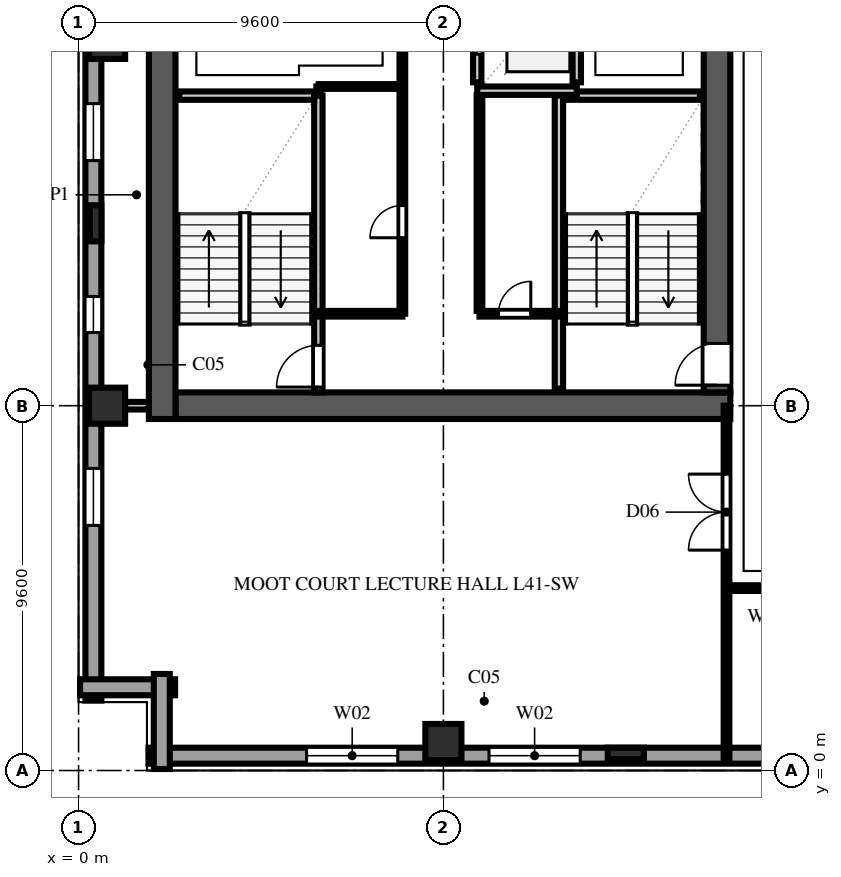
"""IFC4 building model, lengths in metres.
Left out: names, types, materials, properties, quantities, classifications, styles, units other than length and angle.
Written with IfcOpenShell. Run it as: python <this file> out.ifc"""

import sys

from ifc_helpers import new_model, si_unit, direction, frame, frame_2d, origin, origin_2d, place, context, subcontext, project, spatial, rectangle, extrude, element, fill, save


model = new_model("IFC4")
c1 = context("Model", 3, precision=1e-05, world=origin(), true_north=direction((0.0, 1.0)))
c2 = subcontext(c1, "Body", "Model", "MODEL_VIEW")
j1 = project(units=[si_unit("LENGTHUNIT", "METRE"), si_unit("PLANEANGLEUNIT", "RADIAN")], contexts=[c1])
p1 = place(None, origin())
s1 = spatial("IfcSite", under=j1, at=p1, CompositionType="ELEMENT")
p2 = place(p1, origin())
s2 = spatial("IfcBuilding", under=s1, at=p2, CompositionType="ELEMENT")
p3 = place(p2, frame((0.0, 0.0, 163.6)))
s3 = spatial("IfcBuildingStorey", under=s2, at=p3, CompositionType="ELEMENT", Elevation=163.6)
p4 = place(p3, frame((2.55, 9.6, 0.0), z_axis=(0.0, 0.0, 1.0), x_axis=(1.0, 0.0, 0.0)))
e1 = element("IfcWall", 1, at=p4, inside=s3, PredefinedType="SHEAR", context=c2, shape_type="SweptSolid", body=[
    extrude(rectangle(XDim=14.6, YDim=0.7, at=frame_2d((7.3, 0.0))), origin(), (0.0, 0.0, 1.0), 3.54),
])
p5 = place(p3, frame((2.2, 9.25, 0.0), z_axis=(0.0, 0.0, 1.0), x_axis=(0.0, 1.0, 0.0)))
e2 = element("IfcWall", 2, at=p5, inside=s3, PredefinedType="SHEAR", context=c2, shape_type="SweptSolid", body=[
    extrude(rectangle(XDim=39.1, YDim=0.7, at=frame_2d((19.55, 0.0))), origin(), (0.0, 0.0, 1.0), 3.54),
])
p6 = place(p3, frame((16.8, 9.95, 0.0), z_axis=(0.0, 0.0, 1.0), x_axis=(0.0, 1.0, 0.0)))
e3 = element("IfcWall", 3, at=p6, inside=s3, PredefinedType="SHEAR", context=c2, shape_type="SweptSolid", body=[
    extrude(rectangle(XDim=12.45, YDim=0.7, at=frame_2d((6.225, 0.0))), origin(), (0.0, 0.0, 1.0), 3.54),
])
p7 = place(p6, frame((0.19, 0.0, 0.0)))
e4 = element("IfcOpeningElement", 4, at=p7, cuts=e3, PredefinedType="OPENING", context=c2, shape_type="SweptSolid", body=[
    extrude(rectangle(XDim=1.1, YDim=2.2, at=frame_2d((0.55, 1.1))), frame((0.0, 0.362, 0.0), z_axis=(0.0, -1.0, 0.0), x_axis=(1.0, 0.0, 0.0)), (0.0, 0.0, 1.0), 0.724),
])
for number, where, z_axis, x_axis in (
    (5, (0.75, 9.6, 0.0), (0.0, 0.0, 1.0), (1.0, 0.0, 0.0)),
    (6, (0.75, 19.2, 0.0), (0.0, 0.0, 1.0), (1.0, 0.0, 0.0)),
    (7, (9.6, 0.75, 0.0), (0.0, 0.0, 1.0), (1.0, 0.0, 0.0)),
):
    element("IfcColumn", number, at=place(p3, frame(where, z_axis=z_axis, x_axis=x_axis)), inside=s3, PredefinedType="COLUMN", context=c2, shape_type="SweptSolid", body=[
        extrude(rectangle(XDim=0.95, YDim=0.95, at=origin_2d()), origin(), (0.0, 0.0, 1.0), 3.8),
    ])
for number, where, z_axis, x_axis in (
    (8, (0.45, 14.4, 0.0), (0.0, 0.0, 1.0), (0.0, 1.0, 0.0)),
    (9, (14.4, 0.45, 0.0), (0.0, 0.0, 1.0), (1.0, 0.0, 0.0)),
):
    element("IfcColumn", number, at=place(p3, frame(where, z_axis=z_axis, x_axis=x_axis)), inside=s3, PredefinedType="PILASTER", context=c2, shape_type="SweptSolid", body=[
        extrude(rectangle(XDim=0.95, YDim=0.3, at=origin_2d()), origin(), (0.0, 0.0, 1.0), 3.8),
    ])
p8 = place(p3, frame((1.84, 0.39, 0.0), z_axis=(0.0, 0.0, 1.0), x_axis=(1.0, 0.0, 0.0)))
e10 = element("IfcWall", 10, at=p8, inside=s3, PredefinedType="SOLIDWALL", context=c2, shape_type="SweptSolid", body=[
    extrude(rectangle(XDim=53.92, YDim=0.42, at=frame_2d((26.96, 0.0))), origin(), (0.0, 0.0, 1.0), 3.54),
])
p9 = place(p8, frame((4.16, 0.0, 0.85)))
e11 = element("IfcOpeningElement", 11, at=p9, cuts=e10, PredefinedType="OPENING", context=c2, shape_type="SweptSolid", body=[
    extrude(rectangle(XDim=2.4, YDim=1.85, at=frame_2d((1.2, 0.925))), frame((0.0, 0.222, 0.0), z_axis=(0.0, -1.0, 0.0), x_axis=(1.0, 0.0, 0.0)), (0.0, 0.0, 1.0), 0.444),
])
p10 = place(p8, frame((8.96, 0.0, 0.85)))
e12 = element("IfcOpeningElement", 12, at=p10, cuts=e10, PredefinedType="OPENING", context=c2, shape_type="SweptSolid", body=[
    extrude(rectangle(XDim=2.4, YDim=1.85, at=frame_2d((1.2, 0.925))), frame((0.0, 0.222, 0.0), z_axis=(0.0, -1.0, 0.0), x_axis=(1.0, 0.0, 0.0)), (0.0, 0.0, 1.0), 0.444),
])
p11 = place(p8, frame((18.56, 0.0, 0.85)))
e13 = element("IfcOpeningElement", 13, at=p11, cuts=e10, PredefinedType="OPENING", context=c2, shape_type="SweptSolid", body=[
    extrude(rectangle(XDim=2.4, YDim=1.85, at=frame_2d((1.2, 0.925))), frame((0.0, 0.222, 0.0), z_axis=(0.0, -1.0, 0.0), x_axis=(1.0, 0.0, 0.0)), (0.0, 0.0, 1.0), 0.444),
])
p12 = place(p8, frame((28.16, 0.0, 0.85)))
e14 = element("IfcOpeningElement", 14, at=p12, cuts=e10, PredefinedType="OPENING", context=c2, shape_type="SweptSolid", body=[
    extrude(rectangle(XDim=2.4, YDim=1.85, at=frame_2d((1.2, 0.925))), frame((0.0, 0.222, 0.0), z_axis=(0.0, -1.0, 0.0), x_axis=(1.0, 0.0, 0.0)), (0.0, 0.0, 1.0), 0.444),
])
p13 = place(p3, frame((0.39, 65.36, 0.0), z_axis=(0.0, 0.0, 1.0), x_axis=(0.0, -1.0, 0.0)))
e15 = element("IfcWall", 15, at=p13, inside=s3, PredefinedType="SOLIDWALL", context=c2, shape_type="SweptSolid", body=[
    extrude(rectangle(XDim=63.52, YDim=0.42, at=frame_2d((31.76, 0.0))), origin(), (0.0, 0.0, 1.0), 3.54),
])
p14 = place(p13, frame((4.885, 0.0, 0.9)))
e16 = element("IfcOpeningElement", 16, at=p14, cuts=e15, PredefinedType="OPENING", context=c2, shape_type="SweptSolid", body=[
    extrude(rectangle(XDim=0.95, YDim=1.85, at=frame_2d((0.475, 0.925))), frame((0.0, 0.222, 0.0), z_axis=(0.0, -1.0, 0.0), x_axis=(1.0, 0.0, 0.0)), (0.0, 0.0, 1.0), 0.444),
])
p15 = place(p13, frame((9.41, 0.0, 0.9)))
e17 = element("IfcOpeningElement", 17, at=p15, cuts=e15, PredefinedType="OPENING", context=c2, shape_type="SweptSolid", body=[
    extrude(rectangle(XDim=1.5, YDim=1.85, at=frame_2d((0.75, 0.925))), frame((0.0, 0.222, 0.0), z_axis=(0.0, -1.0, 0.0), x_axis=(1.0, 0.0, 0.0)), (0.0, 0.0, 1.0), 0.444),
])
p16 = place(p13, frame((14.485, 0.0, 0.9)))
e18 = element("IfcOpeningElement", 18, at=p16, cuts=e15, PredefinedType="OPENING", context=c2, shape_type="SweptSolid", body=[
    extrude(rectangle(XDim=0.95, YDim=1.85, at=frame_2d((0.475, 0.925))), frame((0.0, 0.222, 0.0), z_axis=(0.0, -1.0, 0.0), x_axis=(1.0, 0.0, 0.0)), (0.0, 0.0, 1.0), 0.444),
])
p17 = place(p13, frame((19.01, 0.0, 0.9)))
e19 = element("IfcOpeningElement", 19, at=p17, cuts=e15, PredefinedType="OPENING", context=c2, shape_type="SweptSolid", body=[
    extrude(rectangle(XDim=1.5, YDim=1.85, at=frame_2d((0.75, 0.925))), frame((0.0, 0.222, 0.0), z_axis=(0.0, -1.0, 0.0), x_axis=(1.0, 0.0, 0.0)), (0.0, 0.0, 1.0), 0.444),
])
p18 = place(p13, frame((24.085, 0.0, 0.9)))
e20 = element("IfcOpeningElement", 20, at=p18, cuts=e15, PredefinedType="OPENING", context=c2, shape_type="SweptSolid", body=[
    extrude(rectangle(XDim=0.95, YDim=1.85, at=frame_2d((0.475, 0.925))), frame((0.0, 0.222, 0.0), z_axis=(0.0, -1.0, 0.0), x_axis=(1.0, 0.0, 0.0)), (0.0, 0.0, 1.0), 0.444),
])
p19 = place(p13, frame((28.61, 0.0, 0.9)))
e21 = element("IfcOpeningElement", 21, at=p19, cuts=e15, PredefinedType="OPENING", context=c2, shape_type="SweptSolid", body=[
    extrude(rectangle(XDim=1.5, YDim=1.85, at=frame_2d((0.75, 0.925))), frame((0.0, 0.222, 0.0), z_axis=(0.0, -1.0, 0.0), x_axis=(1.0, 0.0, 0.0)), (0.0, 0.0, 1.0), 0.444),
])
p20 = place(p13, frame((33.685, 0.0, 0.9)))
e22 = element("IfcOpeningElement", 22, at=p20, cuts=e15, PredefinedType="OPENING", context=c2, shape_type="SweptSolid", body=[
    extrude(rectangle(XDim=0.95, YDim=1.85, at=frame_2d((0.475, 0.925))), frame((0.0, 0.222, 0.0), z_axis=(0.0, -1.0, 0.0), x_axis=(1.0, 0.0, 0.0)), (0.0, 0.0, 1.0), 0.444),
])
p21 = place(p13, frame((38.21, 0.0, 0.9)))
e23 = element("IfcOpeningElement", 23, at=p21, cuts=e15, PredefinedType="OPENING", context=c2, shape_type="SweptSolid", body=[
    extrude(rectangle(XDim=1.5, YDim=1.85, at=frame_2d((0.75, 0.925))), frame((0.0, 0.222, 0.0), z_axis=(0.0, -1.0, 0.0), x_axis=(1.0, 0.0, 0.0)), (0.0, 0.0, 1.0), 0.444),
])
p22 = place(p13, frame((43.285, 0.0, 0.9)))
e24 = element("IfcOpeningElement", 24, at=p22, cuts=e15, PredefinedType="OPENING", context=c2, shape_type="SweptSolid", body=[
    extrude(rectangle(XDim=0.95, YDim=1.85, at=frame_2d((0.475, 0.925))), frame((0.0, 0.222, 0.0), z_axis=(0.0, -1.0, 0.0), x_axis=(1.0, 0.0, 0.0)), (0.0, 0.0, 1.0), 0.444),
])
p23 = place(p13, frame((47.81, 0.0, 0.9)))
e25 = element("IfcOpeningElement", 25, at=p23, cuts=e15, PredefinedType="OPENING", context=c2, shape_type="SweptSolid", body=[
    extrude(rectangle(XDim=1.5, YDim=1.85, at=frame_2d((0.75, 0.925))), frame((0.0, 0.222, 0.0), z_axis=(0.0, -1.0, 0.0), x_axis=(1.0, 0.0, 0.0)), (0.0, 0.0, 1.0), 0.444),
])
p24 = place(p13, frame((52.885, 0.0, 0.9)))
e26 = element("IfcOpeningElement", 26, at=p24, cuts=e15, PredefinedType="OPENING", context=c2, shape_type="SweptSolid", body=[
    extrude(rectangle(XDim=0.95, YDim=1.85, at=frame_2d((0.475, 0.925))), frame((0.0, 0.222, 0.0), z_axis=(0.0, -1.0, 0.0), x_axis=(1.0, 0.0, 0.0)), (0.0, 0.0, 1.0), 0.444),
])
p25 = place(p13, frame((57.41, 0.0, 0.9)))
e27 = element("IfcOpeningElement", 27, at=p25, cuts=e15, PredefinedType="OPENING", context=c2, shape_type="SweptSolid", body=[
    extrude(rectangle(XDim=1.5, YDim=1.85, at=frame_2d((0.75, 0.925))), frame((0.0, 0.222, 0.0), z_axis=(0.0, -1.0, 0.0), x_axis=(1.0, 0.0, 0.0)), (0.0, 0.0, 1.0), 0.444),
])
for number, where, z_axis, x_axis in (
    (28, (0.04, 2.19, 0.0), (0.0, 0.0, 1.0), (1.0, 0.0, 0.0)),
    (29, (2.19, 2.54, 0.0), (0.0, 0.0, 1.0), (0.0, -1.0, 0.0)),
):
    element("IfcWall", number, at=place(p3, frame(where, z_axis=z_axis, x_axis=x_axis)), inside=s3, PredefinedType="SOLIDWALL", context=c2, shape_type="SweptSolid", body=[
        extrude(rectangle(XDim=2.5, YDim=0.42, at=frame_2d((1.25, 0.0))), origin(), (0.0, 0.0, 1.0), 3.54),
    ])
p26 = place(p3, frame((6.31, 9.95, 0.0), z_axis=(0.0, 0.0, 1.0), x_axis=(0.0, 1.0, 0.0)))
e30 = element("IfcWall", 30, at=p26, inside=s3, PredefinedType="SOLIDWALL", context=c2, shape_type="SweptSolid", body=[
    extrude(rectangle(XDim=7.81, YDim=0.22, at=frame_2d((3.905, 0.0))), origin(), (0.0, 0.0, 1.0), 3.54),
])
p27 = place(p26, frame((0.14, 0.0, 0.0)))
e31 = element("IfcOpeningElement", 31, at=p27, cuts=e30, PredefinedType="OPENING", context=c2, shape_type="SweptSolid", body=[
    extrude(rectangle(XDim=1.1, YDim=2.2, at=frame_2d((0.55, 1.1))), frame((0.0, 0.122, 0.0), z_axis=(0.0, -1.0, 0.0), x_axis=(1.0, 0.0, 0.0)), (0.0, 0.0, 1.0), 0.244),
])
p28 = place(p3, frame((2.65, 17.76, 0.0), z_axis=(0.0, 0.0, 1.0), x_axis=(1.0, 0.0, 0.0)))
e32 = element("IfcWall", 32, at=p28, inside=s3, PredefinedType="SOLIDWALL", context=c2, shape_type="SweptSolid", body=[
    extrude(rectangle(XDim=3.55, YDim=0.22, at=frame_2d((1.775, 0.0))), origin(), (0.0, 0.0, 1.0), 3.54),
])
p29 = place(p3, frame((12.64, 10.05, 0.0), z_axis=(0.0, 0.0, 1.0), x_axis=(0.0, 1.0, 0.0)))
e33 = element("IfcWall", 33, at=p29, inside=s3, PredefinedType="SOLIDWALL", context=c2, shape_type="SweptSolid", body=[
    extrude(rectangle(XDim=7.71, YDim=0.22, at=frame_2d((3.855, 0.0))), origin(), (0.0, 0.0, 1.0), 3.54),
])
p30 = place(p3, frame((12.75, 17.76, 0.0), z_axis=(0.0, 0.0, 1.0), x_axis=(1.0, 0.0, 0.0)))
e34 = element("IfcWall", 34, at=p30, inside=s3, PredefinedType="SOLIDWALL", context=c2, shape_type="SweptSolid", body=[
    extrude(rectangle(XDim=3.6, YDim=0.22, at=frame_2d((1.8, 0.0))), origin(), (0.0, 0.0, 1.0), 3.54),
])
p31 = place(p3, frame((10.49, 18.11, 0.0), z_axis=(0.0, 0.0, 1.0), x_axis=(0.0, 1.0, 0.0)))
e35 = element("IfcWall", 35, at=p31, inside=s3, PredefinedType="SOLIDWALL", context=c2, shape_type="SweptSolid", body=[
    extrude(rectangle(XDim=2.58, YDim=0.22, at=frame_2d((1.29, 0.0))), origin(), (0.0, 0.0, 1.0), 3.54),
])
p32 = place(p31, frame((0.74, 0.0, 0.0)))
e36 = element("IfcOpeningElement", 36, at=p32, cuts=e35, PredefinedType="OPENING", context=c2, shape_type="SweptSolid", body=[
    extrude(rectangle(XDim=1.1, YDim=2.2, at=frame_2d((0.55, 1.1))), frame((0.0, 0.122, 0.0), z_axis=(0.0, -1.0, 0.0), x_axis=(1.0, 0.0, 0.0)), (0.0, 0.0, 1.0), 0.244),
])
p33 = place(p3, frame((13.11, 18.11, 0.0), z_axis=(0.0, 0.0, 1.0), x_axis=(0.0, 1.0, 0.0)))
e37 = element("IfcWall", 37, at=p33, inside=s3, PredefinedType="SOLIDWALL", context=c2, shape_type="SweptSolid", body=[
    extrude(rectangle(XDim=2.58, YDim=0.22, at=frame_2d((1.29, 0.0))), origin(), (0.0, 0.0, 1.0), 3.54),
])
p34 = place(p3, frame((10.49, 17.89, 0.0), z_axis=(0.0, 0.0, 1.0), x_axis=(1.0, 0.0, 0.0)))
e38 = element("IfcWall", 38, at=p34, inside=s3, PredefinedType="SOLIDWALL", context=c2, shape_type="SweptSolid", body=[
    extrude(rectangle(XDim=2.62, YDim=0.22, at=frame_2d((1.31, 0.0))), origin(), (0.0, 0.0, 1.0), 3.54),
])
p35 = place(p3, frame((10.55, 12.02, 0.0), z_axis=(0.0, 0.0, 1.0), x_axis=(1.0, 0.0, 0.0)))
e39 = element("IfcWall", 39, at=p35, inside=s3, PredefinedType="PARTITIONING", context=c2, shape_type="SweptSolid", body=[
    extrude(rectangle(XDim=2.08, YDim=0.15, at=frame_2d((1.04, 0.0))), origin(), (0.0, 0.0, 1.0), 3.54),
])
p36 = place(p35, frame((0.5, 0.0, 0.0)))
e40 = element("IfcOpeningElement", 40, at=p36, cuts=e39, PredefinedType="OPENING", context=c2, shape_type="SweptSolid", body=[
    extrude(rectangle(XDim=0.85, YDim=2.1, at=frame_2d((0.425, 1.05))), frame((0.0, 0.087, 0.0), z_axis=(0.0, -1.0, 0.0), x_axis=(1.0, 0.0, 0.0)), (0.0, 0.0, 1.0), 0.174),
])
p37 = place(p3, frame((10.55, 12.095, 0.0), z_axis=(0.0, 0.0, 1.0), x_axis=(0.0, 1.0, 0.0)))
e41 = element("IfcWall", 41, at=p37, inside=s3, PredefinedType="PARTITIONING", context=c2, shape_type="SweptSolid", body=[
    extrude(rectangle(XDim=5.68, YDim=0.15, at=frame_2d((2.84, 0.0))), origin(), (0.0, 0.0, 1.0), 3.54),
])
p38 = place(p3, frame((6.32, 12.02, 0.0), z_axis=(0.0, 0.0, 1.0), x_axis=(1.0, 0.0, 0.0)))
e42 = element("IfcWall", 42, at=p38, inside=s3, PredefinedType="PARTITIONING", context=c2, shape_type="SweptSolid", body=[
    extrude(rectangle(XDim=2.2, YDim=0.15, at=frame_2d((1.1, 0.0))), origin(), (0.0, 0.0, 1.0), 3.54),
])
p39 = place(p3, frame((6.32, 17.8, 0.0), z_axis=(0.0, 0.0, 1.0), x_axis=(0.0, 1.0, 0.0)))
e43 = element("IfcWall", 43, at=p39, inside=s3, PredefinedType="PARTITIONING", context=c2, shape_type="SweptSolid", body=[
    extrude(rectangle(XDim=0.2, YDim=0.125, at=frame_2d((0.1, 0.0))), origin(), (0.0, 0.0, 1.0), 3.54),
])
p40 = place(p3, frame((6.32, 18.0, 0.0), z_axis=(0.0, 0.0, 1.0), x_axis=(1.0, 0.0, 0.0)))
e44 = element("IfcWall", 44, at=p40, inside=s3, PredefinedType="PARTITIONING", context=c2, shape_type="SweptSolid", body=[
    extrude(rectangle(XDim=2.2, YDim=0.125, at=frame_2d((1.1, 0.0))), origin(), (0.0, 0.0, 1.0), 3.54),
])
p41 = place(p3, frame((8.52, 12.02, 0.0), z_axis=(0.0, 0.0, 1.0), x_axis=(0.0, 1.0, 0.0)))
e45 = element("IfcWall", 45, at=p41, inside=s3, PredefinedType="PARTITIONING", context=c2, shape_type="SweptSolid", body=[
    extrude(rectangle(XDim=24.76, YDim=0.15, at=frame_2d((12.38, 0.0))), origin(), (0.0, 0.0, 1.0), 3.54),
])
p42 = place(p41, frame((2.0, 0.0, 0.0)))
e46 = element("IfcOpeningElement", 46, at=p42, cuts=e45, PredefinedType="OPENING", context=c2, shape_type="SweptSolid", body=[
    extrude(rectangle(XDim=0.85, YDim=2.1, at=frame_2d((0.425, 1.05))), frame((0.0, 0.087, 0.0), z_axis=(0.0, -1.0, 0.0), x_axis=(1.0, 0.0, 0.0)), (0.0, 0.0, 1.0), 0.174),
])
p43 = place(p41, frame((12.0, 0.0, 0.0)))
e47 = element("IfcOpeningElement", 47, at=p43, cuts=e45, PredefinedType="OPENING", context=c2, shape_type="SweptSolid", body=[
    extrude(rectangle(XDim=1.0, YDim=2.2, at=frame_2d((0.5, 1.1))), frame((0.0, 0.087, 0.0), z_axis=(0.0, -1.0, 0.0), x_axis=(1.0, 0.0, 0.0)), (0.0, 0.0, 1.0), 0.174),
])
p44 = place(p3, frame((0.85, 9.6, 0.0), z_axis=(0.0, 0.0, 1.0), x_axis=(1.0, 0.0, 0.0)))
e48 = element("IfcWall", 48, at=p44, inside=s3, PredefinedType="SOLIDWALL", context=c2, shape_type="SweptSolid", body=[
    extrude(rectangle(XDim=0.995, YDim=0.2, at=frame_2d((0.498, 0.0))), origin(), (0.0, 0.0, 1.0), 3.123),
])
p45 = place(p3, frame((17.05, 4.8, 0.0), z_axis=(0.0, 0.0, 1.0), x_axis=(1.0, 0.0, 0.0)))
e49 = element("IfcWall", 49, at=p45, inside=s3, PredefinedType="PARTITIONING", context=c2, shape_type="SweptSolid", body=[
    extrude(rectangle(XDim=2.15, YDim=0.15, at=frame_2d((1.075, 0.0))), origin(), (0.0, 0.0, 1.0), 3.54),
])
p46 = place(p3, frame((17.05, 0.22, 0.0), z_axis=(0.0, 0.0, 1.0), x_axis=(0.0, 1.0, 0.0)))
e50 = element("IfcWall", 50, at=p46, inside=s3, PredefinedType="PARTITIONING", context=c2, shape_type="SweptSolid", body=[
    extrude(rectangle(XDim=9.38, YDim=0.15, at=frame_2d((4.69, 0.0))), origin(), (0.0, 0.0, 1.0), 3.54),
])
p47 = place(p46, frame((5.58, 0.0, 0.0)))
e51 = element("IfcOpeningElement", 51, at=p47, cuts=e50, PredefinedType="OPENING", context=c2, shape_type="SweptSolid", body=[
    extrude(rectangle(XDim=2.0, YDim=2.3, at=frame_2d((1.0, 1.15))), frame((0.0, 0.087, 0.0), z_axis=(0.0, -1.0, 0.0), x_axis=(1.0, 0.0, 0.0)), (0.0, 0.0, 1.0), 0.174),
])
p48 = place(p9, origin())
e52 = element("IfcWindow", 52, at=p48, inside=s3, PartitioningType="TRIPLE_PANEL_VERTICAL", PredefinedType="WINDOW", context=c2, shape_type="SweptSolid", body=[
    extrude(rectangle(XDim=2.4, YDim=1.85, at=frame_2d((1.2, 0.925))), frame((0.0, 0.11, 0.0), z_axis=(0.0, -1.0, 0.0), x_axis=(1.0, 0.0, 0.0)), (0.0, 0.0, 1.0), 0.06),
])
fill(e11, e52)
p49 = place(p10, origin())
e53 = element("IfcWindow", 53, at=p49, inside=s3, PartitioningType="TRIPLE_PANEL_VERTICAL", PredefinedType="WINDOW", context=c2, shape_type="SweptSolid", body=[
    extrude(rectangle(XDim=2.4, YDim=1.85, at=frame_2d((1.2, 0.925))), frame((0.0, 0.11, 0.0), z_axis=(0.0, -1.0, 0.0), x_axis=(1.0, 0.0, 0.0)), (0.0, 0.0, 1.0), 0.06),
])
fill(e12, e53)
p50 = place(p23, origin())
e54 = element("IfcWindow", 54, at=p50, inside=s3, PartitioningType="DOUBLE_PANEL_VERTICAL", PredefinedType="WINDOW", context=c2, shape_type="SweptSolid", body=[
    extrude(rectangle(XDim=1.5, YDim=1.85, at=frame_2d((0.75, 0.925))), frame((0.0, 0.11, 0.0), z_axis=(0.0, -1.0, 0.0), x_axis=(1.0, 0.0, 0.0)), (0.0, 0.0, 1.0), 0.06),
])
fill(e25, e54)
p51 = place(p24, origin())
e55 = element("IfcWindow", 55, at=p51, inside=s3, PartitioningType="SINGLE_PANEL", PredefinedType="WINDOW", context=c2, shape_type="SweptSolid", body=[
    extrude(rectangle(XDim=0.95, YDim=1.85, at=frame_2d((0.475, 0.925))), frame((0.0, 0.11, 0.0), z_axis=(0.0, -1.0, 0.0), x_axis=(1.0, 0.0, 0.0)), (0.0, 0.0, 1.0), 0.06),
])
fill(e26, e55)
p52 = place(p25, origin())
e56 = element("IfcWindow", 56, at=p52, inside=s3, PartitioningType="DOUBLE_PANEL_VERTICAL", PredefinedType="WINDOW", context=c2, shape_type="SweptSolid", body=[
    extrude(rectangle(XDim=1.5, YDim=1.85, at=frame_2d((0.75, 0.925))), frame((0.0, 0.11, 0.0), z_axis=(0.0, -1.0, 0.0), x_axis=(1.0, 0.0, 0.0)), (0.0, 0.0, 1.0), 0.06),
])
fill(e27, e56)
p53 = place(p27, origin())
e57 = element("IfcDoor", 57, at=p53, inside=s3, OperationType="SINGLE_SWING_LEFT", PredefinedType="DOOR", context=c2, shape_type="SweptSolid", body=[
    extrude(rectangle(XDim=1.1, YDim=2.2, at=frame_2d((0.55, 1.1))), frame((0.0, 0.025, 0.0), z_axis=(0.0, -1.0, 0.0), x_axis=(1.0, 0.0, 0.0)), (0.0, 0.0, 1.0), 0.05),
])
fill(e31, e57)
p54 = place(p7, origin())
e58 = element("IfcDoor", 58, at=p54, inside=s3, OperationType="SINGLE_SWING_LEFT", PredefinedType="DOOR", context=c2, shape_type="SweptSolid", body=[
    extrude(rectangle(XDim=1.1, YDim=2.2, at=frame_2d((0.55, 1.1))), frame((0.0, 0.025, 0.0), z_axis=(0.0, -1.0, 0.0), x_axis=(1.0, 0.0, 0.0)), (0.0, 0.0, 1.0), 0.05),
])
fill(e4, e58)
p55 = place(p32, origin())
e59 = element("IfcDoor", 59, at=p55, inside=s3, OperationType="DOUBLE_DOOR_SLIDING", PredefinedType="DOOR", context=c2, shape_type="SweptSolid", body=[
    extrude(rectangle(XDim=1.1, YDim=2.2, at=frame_2d((0.55, 1.1))), frame((0.0, 0.025, 0.0), z_axis=(0.0, -1.0, 0.0), x_axis=(1.0, 0.0, 0.0)), (0.0, 0.0, 1.0), 0.05),
])
fill(e36, e59)
p56 = place(p36, origin())
e60 = element("IfcDoor", 60, at=p56, inside=s3, OperationType="SINGLE_SWING_RIGHT", PredefinedType="DOOR", context=c2, shape_type="SweptSolid", body=[
    extrude(rectangle(XDim=0.85, YDim=2.1, at=frame_2d((0.425, 1.05))), frame((0.0, 0.025, 0.0), z_axis=(0.0, -1.0, 0.0), x_axis=(1.0, 0.0, 0.0)), (0.0, 0.0, 1.0), 0.05),
])
fill(e40, e60)
p57 = place(p42, origin())
e61 = element("IfcDoor", 61, at=p57, inside=s3, OperationType="SINGLE_SWING_LEFT", PredefinedType="DOOR", context=c2, shape_type="SweptSolid", body=[
    extrude(rectangle(XDim=0.85, YDim=2.1, at=frame_2d((0.425, 1.05))), frame((0.0, 0.025, 0.0), z_axis=(0.0, -1.0, 0.0), x_axis=(1.0, 0.0, 0.0)), (0.0, 0.0, 1.0), 0.05),
])
fill(e46, e61)
p58 = place(p47, origin())
e62 = element("IfcDoor", 62, at=p58, inside=s3, OperationType="DOUBLE_SWING_LEFT", PredefinedType="DOOR", context=c2, shape_type="SweptSolid", body=[
    extrude(rectangle(XDim=2.0, YDim=2.3, at=frame_2d((1.0, 1.15))), frame((0.0, 0.025, 0.0), z_axis=(0.0, -1.0, 0.0), x_axis=(1.0, 0.0, 0.0)), (0.0, 0.0, 1.0), 0.05),
])
fill(e51, e62)
save(model, sys.argv[1])
